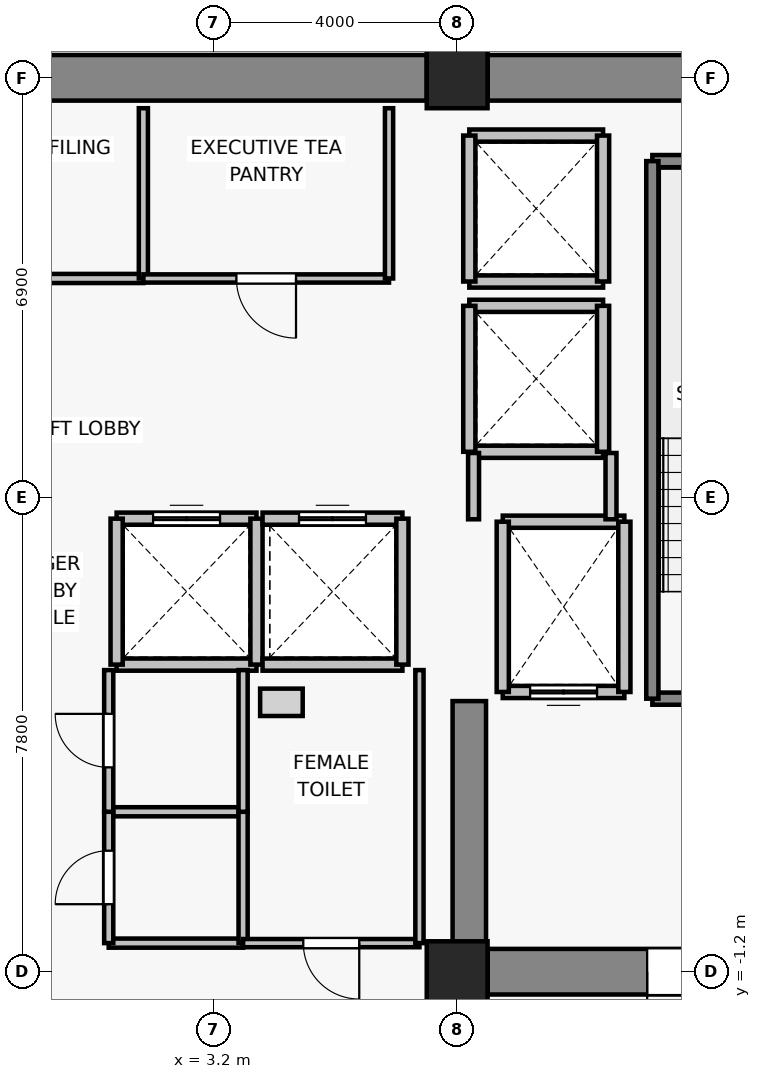
"""IFC4 building model, lengths in metres.
Left out: names, types, materials, properties, quantities, classifications, styles, units other than length and angle.
Written with IfcOpenShell. Run it as: python <this file> out.ifc"""

import sys

from ifc_helpers import new_model, si_unit, direction, frame, frame_2d, origin, origin_2d, place, context, subcontext, project, spatial, rectangle, extrude, source, transform, mapped, element, fill, save


model = new_model("IFC4")
c1 = context("Model", 3, precision=1e-05, world=origin(), true_north=direction((0.0, 1.0)))
c2 = subcontext(c1, "Body", "Model", "MODEL_VIEW")
j1 = project(units=[si_unit("LENGTHUNIT", "METRE"), si_unit("PLANEANGLEUNIT", "RADIAN")], contexts=[c1])
p1 = place(None, origin())
s1 = spatial("IfcSite", under=j1, at=p1, CompositionType="ELEMENT")
p2 = place(p1, origin())
s2 = spatial("IfcBuilding", under=s1, at=p2, CompositionType="ELEMENT")
p3 = place(p2, frame((0.0, 0.0, 175.9)))
s3 = spatial("IfcBuildingStorey", under=s2, at=p3, CompositionType="ELEMENT", Elevation=175.9)
for number, where, z_axis, x_axis in (
    (1, (7.2, -1.2, 0.0), (0.0, 0.0, 1.0), (1.0, 0.0, 0.0)),
    (2, (7.2, 13.5, 0.0), (0.0, 0.0, 1.0), (1.0, 0.0, 0.0)),
):
    element("IfcColumn", number, at=place(p3, frame(where, z_axis=z_axis, x_axis=x_axis)), inside=s3, PredefinedType="COLUMN", context=c2, shape_type="SweptSolid", body=[
        extrude(rectangle(XDim=1.0, YDim=1.0, at=origin_2d()), origin(), (0.0, 0.0, 1.0), 3.3),
    ])
p4 = place(p3, frame((-6.7, 13.5, 0.0), z_axis=(0.0, 0.0, 1.0), x_axis=(1.0, 0.0, 0.0)))
e3 = element("IfcWall", 3, at=p4, inside=s3, PredefinedType="SHEAR", context=c2, shape_type="SweptSolid", body=[
    extrude(rectangle(XDim=13.4, YDim=0.75, at=frame_2d((6.7, 0.0))), origin(), (0.0, 0.0, 1.0), 3.075),
])
p5 = place(p3, frame((7.7, 13.5, 0.0), z_axis=(0.0, 0.0, 1.0), x_axis=(1.0, 0.0, 0.0)))
e4 = element("IfcWall", 4, at=p5, inside=s3, PredefinedType="SHEAR", context=c2, shape_type="SweptSolid", body=[
    extrude(rectangle(XDim=6.2, YDim=0.75, at=frame_2d((3.1, 0.0))), origin(), (0.0, 0.0, 1.0), 3.075),
])
p6 = place(p3, frame((13.9, -1.2, 0.0), z_axis=(0.0, 0.0, 1.0), x_axis=(-1.0, 0.0, 0.0)))
e5 = element("IfcWall", 5, at=p6, inside=s3, PredefinedType="SHEAR", context=c2, shape_type="SweptSolid", body=[
    extrude(rectangle(XDim=6.2, YDim=0.75, at=frame_2d((3.1, 0.0))), origin(), (0.0, 0.0, 1.0), 3.075),
])
p7 = place(p6, frame((2.425, 0.0, 0.0)))
e6 = element("IfcOpeningElement", 6, at=p7, cuts=e5, PredefinedType="OPENING", context=c2, shape_type="SweptSolid", body=[
    extrude(rectangle(XDim=1.15, YDim=2.15, at=frame_2d((0.575, 1.075))), frame((0.0, 0.385, 0.0), z_axis=(0.0, -1.0, 0.0), x_axis=(1.0, 0.0, 0.0)), (0.0, 0.0, 1.0), 0.77),
])
p8 = place(p3, frame((7.4, -0.825, 0.0), z_axis=(0.0, 0.0, 1.0), x_axis=(0.0, 1.0, 0.0)))
e7 = element("IfcWall", 7, at=p8, inside=s3, PredefinedType="SHEAR", context=c2, shape_type="SweptSolid", body=[
    extrude(rectangle(XDim=4.075, YDim=0.55, at=frame_2d((2.038, 0.0))), origin(), (0.0, 0.0, 1.0), 3.075),
])
p9 = place(p3, frame((9.95, 3.4, 0.0), z_axis=(0.0, 0.0, 1.0), x_axis=(-1.0, 0.0, 0.0)))
e8 = element("IfcWall", 8, at=p9, inside=s3, PredefinedType="SOLIDWALL", context=c2, shape_type="SweptSolid", body=[
    extrude(rectangle(XDim=2.0, YDim=0.2, at=frame_2d((1.0, 0.0))), origin(), (0.0, 0.0, 1.0), 3.075),
])
p10 = place(p9, frame((0.45, 0.0, 0.0)))
e9 = element("IfcOpeningElement", 9, at=p10, cuts=e8, PredefinedType="OPENING", context=c2, shape_type="SweptSolid", body=[
    extrude(rectangle(XDim=1.1, YDim=2.2, at=frame_2d((0.55, 1.1))), frame((0.0, 0.11, 0.0), z_axis=(0.0, -1.0, 0.0), x_axis=(1.0, 0.0, 0.0)), (0.0, 0.0, 1.0), 0.22),
])
p11 = place(p3, frame((7.95, 6.2, 0.0), z_axis=(0.0, 0.0, 1.0), x_axis=(1.0, 0.0, 0.0)))
e10 = element("IfcWall", 10, at=p11, inside=s3, PredefinedType="SOLIDWALL", context=c2, shape_type="SweptSolid", body=[
    extrude(rectangle(XDim=2.0, YDim=0.2, at=frame_2d((1.0, 0.0))), origin(), (0.0, 0.0, 1.0), 3.075),
])
for number, where, z_axis, x_axis in (
    (11, (7.95, 3.4, 0.0), (0.0, 0.0, 1.0), (0.0, 1.0, 0.0)),
    (12, (9.95, 6.2, 0.0), (0.0, 0.0, 1.0), (0.0, -1.0, 0.0)),
):
    element("IfcWall", number, at=place(p3, frame(where, z_axis=z_axis, x_axis=x_axis)), inside=s3, PredefinedType="SOLIDWALL", context=c2, shape_type="SweptSolid", body=[
        extrude(rectangle(XDim=2.8, YDim=0.2, at=frame_2d((1.4, 0.0))), origin(), (0.0, 0.0, 1.0), 3.075),
    ])
p12 = place(p3, frame((3.9, 3.85, 0.0), z_axis=(0.0, 0.0, 1.0), x_axis=(-1.0, 0.0, 0.0)))
e13 = element("IfcWall", 13, at=p12, inside=s3, PredefinedType="SOLIDWALL", context=c2, shape_type="SweptSolid", body=[
    extrude(rectangle(XDim=2.3, YDim=0.2, at=frame_2d((1.15, 0.0))), origin(), (0.0, 0.0, 1.0), 3.075),
])
p13 = place(p3, frame((1.6, 6.25, 0.0), z_axis=(0.0, 0.0, 1.0), x_axis=(1.0, 0.0, 0.0)))
e14 = element("IfcWall", 14, at=p13, inside=s3, PredefinedType="SOLIDWALL", context=c2, shape_type="SweptSolid", body=[
    extrude(rectangle(XDim=2.3, YDim=0.2, at=frame_2d((1.15, 0.0))), origin(), (0.0, 0.0, 1.0), 3.075),
])
p14 = place(p13, frame((0.6, 0.0, 0.0)))
e15 = element("IfcOpeningElement", 15, at=p14, cuts=e14, PredefinedType="OPENING", context=c2, shape_type="SweptSolid", body=[
    extrude(rectangle(XDim=1.1, YDim=2.2, at=frame_2d((0.55, 1.1))), frame((0.0, 0.11, 0.0), z_axis=(0.0, -1.0, 0.0), x_axis=(1.0, 0.0, 0.0)), (0.0, 0.0, 1.0), 0.22),
])
for number, where, z_axis, x_axis in (
    (16, (1.6, 3.85, 0.0), (0.0, 0.0, 1.0), (0.0, 1.0, 0.0)),
    (17, (3.9, 6.25, 0.0), (0.0, 0.0, 1.0), (0.0, -1.0, 0.0)),
):
    element("IfcWall", number, at=place(p3, frame(where, z_axis=z_axis, x_axis=x_axis)), inside=s3, PredefinedType="SOLIDWALL", context=c2, shape_type="SweptSolid", body=[
        extrude(rectangle(XDim=2.4, YDim=0.2, at=frame_2d((1.2, 0.0))), origin(), (0.0, 0.0, 1.0), 3.075),
    ])
p15 = place(p3, frame((6.3, 3.85, 0.0), z_axis=(0.0, 0.0, 1.0), x_axis=(-1.0, 0.0, 0.0)))
e18 = element("IfcWall", 18, at=p15, inside=s3, PredefinedType="SOLIDWALL", context=c2, shape_type="SweptSolid", body=[
    extrude(rectangle(XDim=2.3, YDim=0.2, at=frame_2d((1.15, 0.0))), origin(), (0.0, 0.0, 1.0), 3.075),
])
p16 = place(p3, frame((4.0, 6.25, 0.0), z_axis=(0.0, 0.0, 1.0), x_axis=(1.0, 0.0, 0.0)))
e19 = element("IfcWall", 19, at=p16, inside=s3, PredefinedType="SOLIDWALL", context=c2, shape_type="SweptSolid", body=[
    extrude(rectangle(XDim=2.3, YDim=0.2, at=frame_2d((1.15, 0.0))), origin(), (0.0, 0.0, 1.0), 3.075),
])
p17 = place(p16, frame((0.6, 0.0, 0.0)))
e20 = element("IfcOpeningElement", 20, at=p17, cuts=e19, PredefinedType="OPENING", context=c2, shape_type="SweptSolid", body=[
    extrude(rectangle(XDim=1.1, YDim=2.2, at=frame_2d((0.55, 1.1))), frame((0.0, 0.11, 0.0), z_axis=(0.0, -1.0, 0.0), x_axis=(1.0, 0.0, 0.0)), (0.0, 0.0, 1.0), 0.22),
])
p18 = place(p3, frame((6.3, 6.25, 0.0), z_axis=(0.0, 0.0, 1.0), x_axis=(0.0, -1.0, 0.0)))
e21 = element("IfcWall", 21, at=p18, inside=s3, PredefinedType="SOLIDWALL", context=c2, shape_type="SweptSolid", body=[
    extrude(rectangle(XDim=2.4, YDim=0.2, at=frame_2d((1.2, 0.0))), origin(), (0.0, 0.0, 1.0), 3.075),
])
for number, where, z_axis, x_axis in (
    (22, (9.6, 7.35, 0.0), (0.0, 0.0, 1.0), (-1.0, 0.0, 0.0)),
    (23, (7.4, 9.75, 0.0), (0.0, 0.0, 1.0), (1.0, 0.0, 0.0)),
):
    element("IfcWall", number, at=place(p3, frame(where, z_axis=z_axis, x_axis=x_axis)), inside=s3, PredefinedType="SOLIDWALL", context=c2, shape_type="SweptSolid", body=[
        extrude(rectangle(XDim=2.2, YDim=0.2, at=frame_2d((1.1, 0.0))), origin(), (0.0, 0.0, 1.0), 2.565),
    ])
p19 = place(p3, frame((7.4, 7.35, 0.0), z_axis=(0.0, 0.0, 1.0), x_axis=(0.0, 1.0, 0.0)))
e24 = element("IfcWall", 24, at=p19, inside=s3, PredefinedType="SOLIDWALL", context=c2, shape_type="SweptSolid", body=[
    extrude(rectangle(XDim=2.4, YDim=0.2, at=frame_2d((1.2, 0.0))), origin(), (0.0, 0.0, 1.0), 2.565),
])
p20 = place(p3, frame((9.6, 9.75, 0.0), z_axis=(0.0, 0.0, 1.0), x_axis=(0.0, -1.0, 0.0)))
e25 = element("IfcWall", 25, at=p20, inside=s3, PredefinedType="SOLIDWALL", context=c2, shape_type="SweptSolid", body=[
    extrude(rectangle(XDim=2.4, YDim=0.2, at=frame_2d((1.2, 0.0))), origin(), (0.0, 0.0, 1.0), 3.075),
])
for number, where, z_axis, x_axis in (
    (26, (9.6, 10.15, 0.0), (0.0, 0.0, 1.0), (-1.0, 0.0, 0.0)),
    (27, (7.4, 12.55, 0.0), (0.0, 0.0, 1.0), (1.0, 0.0, 0.0)),
):
    element("IfcWall", number, at=place(p3, frame(where, z_axis=z_axis, x_axis=x_axis)), inside=s3, PredefinedType="SOLIDWALL", context=c2, shape_type="SweptSolid", body=[
        extrude(rectangle(XDim=2.2, YDim=0.2, at=frame_2d((1.1, 0.0))), origin(), (0.0, 0.0, 1.0), 2.565),
    ])
p21 = place(p3, frame((7.4, 10.15, 0.0), z_axis=(0.0, 0.0, 1.0), x_axis=(0.0, 1.0, 0.0)))
e28 = element("IfcWall", 28, at=p21, inside=s3, PredefinedType="SOLIDWALL", context=c2, shape_type="SweptSolid", body=[
    extrude(rectangle(XDim=2.4, YDim=0.2, at=frame_2d((1.2, 0.0))), origin(), (0.0, 0.0, 1.0), 2.565),
])
p22 = place(p3, frame((9.6, 12.55, 0.0), z_axis=(0.0, 0.0, 1.0), x_axis=(0.0, -1.0, 0.0)))
e29 = element("IfcWall", 29, at=p22, inside=s3, PredefinedType="SOLIDWALL", context=c2, shape_type="SweptSolid", body=[
    extrude(rectangle(XDim=2.4, YDim=0.2, at=frame_2d((1.2, 0.0))), origin(), (0.0, 0.0, 1.0), 3.075),
])
p23 = place(p3, frame((13.93, 3.29, 0.0), z_axis=(0.0, 0.0, 1.0), x_axis=(-1.0, 0.0, 0.0)))
e30 = element("IfcWall", 30, at=p23, inside=s3, PredefinedType="SOLIDWALL", context=c2, shape_type="SweptSolid", body=[
    extrude(rectangle(XDim=3.52, YDim=0.2, at=frame_2d((1.76, 0.0))), origin(), (0.0, 0.0, 1.0), 3.075),
])
p24 = place(p23, frame((1.205, 0.0, 0.0)))
e31 = element("IfcOpeningElement", 31, at=p24, cuts=e30, PredefinedType="OPENING", context=c2, shape_type="SweptSolid", body=[
    extrude(rectangle(XDim=1.15, YDim=2.15, at=frame_2d((0.575, 1.075))), frame((0.0, 0.11, 0.0), z_axis=(0.0, -1.0, 0.0), x_axis=(1.0, 0.0, 0.0)), (0.0, 0.0, 1.0), 0.22),
])
p25 = place(p3, frame((10.41, 12.13, 0.0), z_axis=(0.0, 0.0, 1.0), x_axis=(1.0, 0.0, 0.0)))
e32 = element("IfcWall", 32, at=p25, inside=s3, PredefinedType="SOLIDWALL", context=c2, shape_type="SweptSolid", body=[
    extrude(rectangle(XDim=3.52, YDim=0.2, at=frame_2d((1.76, 0.0))), origin(), (0.0, 0.0, 1.0), 3.075),
])
p26 = place(p3, frame((10.41, 3.29, 0.0), z_axis=(0.0, 0.0, 1.0), x_axis=(0.0, 1.0, 0.0)))
e33 = element("IfcWall", 33, at=p26, inside=s3, PredefinedType="SOLIDWALL", context=c2, shape_type="SweptSolid", body=[
    extrude(rectangle(XDim=8.84, YDim=0.2, at=frame_2d((4.42, 0.0))), origin(), (0.0, 0.0, 1.0), 3.075),
])
p27 = place(p3, frame((7.47, 6.24, 0.0), z_axis=(0.0, 0.0, 1.0), x_axis=(0.0, 1.0, 0.0)))
e34 = element("IfcWall", 34, at=p27, inside=s3, PredefinedType="PARTITIONING", context=c2, shape_type="SweptSolid", body=[
    extrude(rectangle(XDim=1.09, YDim=0.18, at=frame_2d((0.545, 0.0))), origin(), (0.0, 0.0, 1.0), 2.565),
])
p28 = place(p3, frame((9.73, 7.33, 0.0), z_axis=(0.0, 0.0, 1.0), x_axis=(0.0, -1.0, 0.0)))
e35 = element("IfcWall", 35, at=p28, inside=s3, PredefinedType="PARTITIONING", context=c2, shape_type="SweptSolid", body=[
    extrude(rectangle(XDim=1.09, YDim=0.18, at=frame_2d((0.545, 0.0))), origin(), (0.0, 0.0, 1.0), 3.075),
])
p29 = place(p3, frame((2.04, 10.2, 0.0), z_axis=(0.0, 0.0, 1.0), x_axis=(-1.0, 0.0, 0.0)))
e36 = element("IfcWall", 36, at=p29, inside=s3, PredefinedType="PARTITIONING", context=c2, shape_type="SweptSolid", body=[
    extrude(rectangle(XDim=4.16, YDim=0.15, at=frame_2d((2.08, 0.0))), origin(), (0.0, 0.0, 1.0), 3.075),
])
p30 = place(p29, frame((1.55, 0.0, 0.0)))
e37 = element("IfcOpeningElement", 37, at=p30, cuts=e36, PredefinedType="OPENING", context=c2, shape_type="SweptSolid", body=[
    extrude(rectangle(XDim=0.98, YDim=2.15, at=frame_2d((0.49, 1.075))), frame((0.0, 0.085, 0.0), z_axis=(0.0, -1.0, 0.0), x_axis=(1.0, 0.0, 0.0)), (0.0, 0.0, 1.0), 0.17),
])
p31 = place(p3, frame((2.04, 13.0, 0.0), z_axis=(0.0, 0.0, 1.0), x_axis=(0.0, -1.0, 0.0)))
e38 = element("IfcWall", 38, at=p31, inside=s3, PredefinedType="PARTITIONING", context=c2, shape_type="SweptSolid", body=[
    extrude(rectangle(XDim=2.8, YDim=0.15, at=frame_2d((1.4, 0.0))), origin(), (0.0, 0.0, 1.0), 3.075),
])
p32 = place(p3, frame((6.08, 10.2, 0.0), z_axis=(0.0, 0.0, 1.0), x_axis=(-1.0, 0.0, 0.0)))
e39 = element("IfcWall", 39, at=p32, inside=s3, PredefinedType="PARTITIONING", context=c2, shape_type="SweptSolid", body=[
    extrude(rectangle(XDim=4.04, YDim=0.135, at=frame_2d((2.02, 0.0))), origin(), (0.0, 0.0, 1.0), 3.075),
])
p33 = place(p32, frame((1.53, 0.0, 0.0)))
e40 = element("IfcOpeningElement", 40, at=p33, cuts=e39, PredefinedType="OPENING", context=c2, shape_type="SweptSolid", body=[
    extrude(rectangle(XDim=0.98, YDim=2.15, at=frame_2d((0.49, 1.075))), frame((0.0, 0.077, 0.0), z_axis=(0.0, -1.0, 0.0), x_axis=(1.0, 0.0, 0.0)), (0.0, 0.0, 1.0), 0.155),
])
p34 = place(p3, frame((6.08, 13.0, 0.0), z_axis=(0.0, 0.0, 1.0), x_axis=(0.0, -1.0, 0.0)))
e41 = element("IfcWall", 41, at=p34, inside=s3, PredefinedType="PARTITIONING", context=c2, shape_type="SweptSolid", body=[
    extrude(rectangle(XDim=2.8, YDim=0.135, at=frame_2d((1.4, 0.0))), origin(), (0.0, 0.0, 1.0), 3.075),
])
for number, where, z_axis, x_axis in (
    (42, (3.68, -0.73, 0.0), (0.0, 0.0, 1.0), (-1.0, 0.0, 0.0)),
    (43, (1.47, 1.43, 0.0), (0.0, 0.0, 1.0), (1.0, 0.0, 0.0)),
):
    element("IfcWall", number, at=place(p3, frame(where, z_axis=z_axis, x_axis=x_axis)), inside=s3, PredefinedType="PARTITIONING", context=c2, shape_type="SweptSolid", body=[
        extrude(rectangle(XDim=2.21, YDim=0.15, at=frame_2d((1.105, 0.0))), origin(), (0.0, 0.0, 1.0), 3.075),
    ])
p35 = place(p3, frame((1.47, -0.73, 0.0), z_axis=(0.0, 0.0, 1.0), x_axis=(0.0, 1.0, 0.0)))
e44 = element("IfcWall", 44, at=p35, inside=s3, PredefinedType="PARTITIONING", context=c2, shape_type="SweptSolid", body=[
    extrude(rectangle(XDim=2.16, YDim=0.15, at=frame_2d((1.08, 0.0))), origin(), (0.0, 0.0, 1.0), 3.075),
])
p36 = place(p35, frame((0.64, 0.0, 0.0)))
e45 = element("IfcOpeningElement", 45, at=p36, cuts=e44, PredefinedType="OPENING", context=c2, shape_type="SweptSolid", body=[
    extrude(rectangle(XDim=0.88, YDim=2.1, at=frame_2d((0.44, 1.05))), frame((0.0, 0.085, 0.0), z_axis=(0.0, -1.0, 0.0), x_axis=(1.0, 0.0, 0.0)), (0.0, 0.0, 1.0), 0.17),
])
p37 = place(p3, frame((3.68, 1.43, 0.0), z_axis=(0.0, 0.0, 1.0), x_axis=(0.0, -1.0, 0.0)))
e46 = element("IfcWall", 46, at=p37, inside=s3, PredefinedType="PARTITIONING", context=c2, shape_type="SweptSolid", body=[
    extrude(rectangle(XDim=2.16, YDim=0.15, at=frame_2d((1.08, 0.0))), origin(), (0.0, 0.0, 1.0), 3.075),
])
p38 = place(p3, frame((1.47, 1.43, 0.0), z_axis=(0.0, 0.0, 1.0), x_axis=(0.0, 1.0, 0.0)))
e47 = element("IfcWall", 47, at=p38, inside=s3, PredefinedType="PARTITIONING", context=c2, shape_type="SweptSolid", body=[
    extrude(rectangle(XDim=2.33, YDim=0.15, at=frame_2d((1.165, 0.0))), origin(), (0.0, 0.0, 1.0), 3.075),
])
p39 = place(p38, frame((0.73, 0.0, 0.0)))
e48 = element("IfcOpeningElement", 48, at=p39, cuts=e47, PredefinedType="OPENING", context=c2, shape_type="SweptSolid", body=[
    extrude(rectangle(XDim=0.88, YDim=2.15, at=frame_2d((0.44, 1.075))), frame((0.0, 0.085, 0.0), z_axis=(0.0, -1.0, 0.0), x_axis=(1.0, 0.0, 0.0)), (0.0, 0.0, 1.0), 0.17),
])
p40 = place(p3, frame((3.68, 3.76, 0.0), z_axis=(0.0, 0.0, 1.0), x_axis=(0.0, -1.0, 0.0)))
e49 = element("IfcWall", 49, at=p40, inside=s3, PredefinedType="PARTITIONING", context=c2, shape_type="SweptSolid", body=[
    extrude(rectangle(XDim=2.33, YDim=0.15, at=frame_2d((1.165, 0.0))), origin(), (0.0, 0.0, 1.0), 3.075),
])
p41 = place(p3, frame((6.58, -0.73, 0.0), z_axis=(0.0, 0.0, 1.0), x_axis=(-1.0, 0.0, 0.0)))
e50 = element("IfcWall", 50, at=p41, inside=s3, PredefinedType="PARTITIONING", context=c2, shape_type="SweptSolid", body=[
    extrude(rectangle(XDim=2.9, YDim=0.135, at=frame_2d((1.45, 0.0))), origin(), (0.0, 0.0, 1.0), 3.075),
])
p42 = place(p41, frame((0.99, 0.0, 0.0)))
e51 = element("IfcOpeningElement", 51, at=p42, cuts=e50, PredefinedType="OPENING", context=c2, shape_type="SweptSolid", body=[
    extrude(rectangle(XDim=0.92, YDim=2.1, at=frame_2d((0.46, 1.05))), frame((0.0, 0.077, 0.0), z_axis=(0.0, -1.0, 0.0), x_axis=(1.0, 0.0, 0.0)), (0.0, 0.0, 1.0), 0.155),
])
p43 = place(p3, frame((6.58, 3.76, 0.0), z_axis=(0.0, 0.0, 1.0), x_axis=(0.0, -1.0, 0.0)))
e52 = element("IfcWall", 52, at=p43, inside=s3, PredefinedType="PARTITIONING", context=c2, shape_type="SweptSolid", body=[
    extrude(rectangle(XDim=4.49, YDim=0.135, at=frame_2d((2.245, 0.0))), origin(), (0.0, 0.0, 1.0), 3.075),
])
m1 = source(origin(), c2, "Body", "SweptSolid", [
    extrude(rectangle(XDim=1.1, YDim=2.2, at=frame_2d((0.55, 1.1))), frame((0.0, 0.025, 0.0), z_axis=(0.0, -1.0, 0.0), x_axis=(1.0, 0.0, 0.0)), (0.0, 0.0, 1.0), 0.05),
])
p44 = place(p10, origin())
e53 = element("IfcDoor", 53, at=p44, inside=s3, OperationType="DOUBLE_DOOR_SLIDING", PredefinedType="DOOR", context=c2, shape_type="MappedRepresentation", body=[
    mapped(m1, transform((0.0, 0.0, 0.0), x_axis=(1.0, 0.0, 0.0), y_axis=(0.0, 1.0, 0.0), z_axis=(0.0, 0.0, 1.0), scale=1.0)),
])
fill(e9, e53)
p45 = place(p14, origin())
e54 = element("IfcDoor", 54, at=p45, inside=s3, OperationType="DOUBLE_DOOR_SLIDING", PredefinedType="DOOR", context=c2, shape_type="MappedRepresentation", body=[
    mapped(m1, transform((0.0, 0.0, 0.0), x_axis=(1.0, 0.0, 0.0), y_axis=(0.0, 1.0, 0.0), z_axis=(0.0, 0.0, 1.0), scale=1.0)),
])
fill(e15, e54)
p46 = place(p17, origin())
e55 = element("IfcDoor", 55, at=p46, inside=s3, OperationType="DOUBLE_DOOR_SLIDING", PredefinedType="DOOR", context=c2, shape_type="MappedRepresentation", body=[
    mapped(m1, transform((0.0, 0.0, 0.0), x_axis=(1.0, 0.0, 0.0), y_axis=(0.0, 1.0, 0.0), z_axis=(0.0, 0.0, 1.0), scale=1.0)),
])
fill(e20, e55)
m2 = source(origin(), c2, "Body", "SweptSolid", [
    extrude(rectangle(XDim=1.15, YDim=2.15, at=frame_2d((0.575, 1.075))), frame((0.0, 0.025, 0.0), z_axis=(0.0, -1.0, 0.0), x_axis=(1.0, 0.0, 0.0)), (0.0, 0.0, 1.0), 0.05),
])
p47 = place(p7, origin())
e56 = element("IfcDoor", 56, at=p47, inside=s3, OperationType="SINGLE_SWING_RIGHT", PredefinedType="DOOR", context=c2, shape_type="MappedRepresentation", body=[
    mapped(m2, transform((0.0, 0.0, 0.0), x_axis=(1.0, 0.0, 0.0), y_axis=(0.0, 1.0, 0.0), z_axis=(0.0, 0.0, 1.0), scale=1.0)),
])
fill(e6, e56)
m3 = source(origin(), c2, "Body", "SweptSolid", [
    extrude(rectangle(XDim=0.98, YDim=2.15, at=frame_2d((0.49, 1.075))), frame((0.0, 0.025, 0.0), z_axis=(0.0, -1.0, 0.0), x_axis=(1.0, 0.0, 0.0)), (0.0, 0.0, 1.0), 0.05),
])
p48 = place(p33, origin())
e57 = element("IfcDoor", 57, at=p48, inside=s3, OperationType="SINGLE_SWING_LEFT", PredefinedType="DOOR", context=c2, shape_type="MappedRepresentation", body=[
    mapped(m3, transform((0.0, 0.0, 0.0), x_axis=(1.0, 0.0, 0.0), y_axis=(0.0, 1.0, 0.0), z_axis=(0.0, 0.0, 1.0), scale=1.0)),
])
fill(e40, e57)
m4 = source(origin(), c2, "Body", "SweptSolid", [
    extrude(rectangle(XDim=0.88, YDim=2.1, at=frame_2d((0.44, 1.05))), frame((0.0, 0.025, 0.0), z_axis=(0.0, -1.0, 0.0), x_axis=(1.0, 0.0, 0.0)), (0.0, 0.0, 1.0), 0.05),
])
p49 = place(p36, origin())
e58 = element("IfcDoor", 58, at=p49, inside=s3, OperationType="SINGLE_SWING_LEFT", PredefinedType="DOOR", context=c2, shape_type="MappedRepresentation", body=[
    mapped(m4, transform((0.0, 0.0, 0.0), x_axis=(1.0, 0.0, 0.0), y_axis=(0.0, 1.0, 0.0), z_axis=(0.0, 0.0, 1.0), scale=1.0)),
])
fill(e45, e58)
m5 = source(origin(), c2, "Body", "SweptSolid", [
    extrude(rectangle(XDim=0.88, YDim=2.15, at=frame_2d((0.44, 1.075))), frame((0.0, 0.025, 0.0), z_axis=(0.0, -1.0, 0.0), x_axis=(1.0, 0.0, 0.0)), (0.0, 0.0, 1.0), 0.05),
])
p50 = place(p39, origin())
e59 = element("IfcDoor", 59, at=p50, inside=s3, OperationType="SINGLE_SWING_RIGHT", PredefinedType="DOOR", context=c2, shape_type="MappedRepresentation", body=[
    mapped(m5, transform((0.0, 0.0, 0.0), x_axis=(1.0, 0.0, 0.0), y_axis=(0.0, 1.0, 0.0), z_axis=(0.0, 0.0, 1.0), scale=1.0)),
])
fill(e48, e59)
m6 = source(origin(), c2, "Body", "SweptSolid", [
    extrude(rectangle(XDim=0.92, YDim=2.1, at=frame_2d((0.46, 1.05))), frame((0.0, 0.025, 0.0), z_axis=(0.0, -1.0, 0.0), x_axis=(1.0, 0.0, 0.0)), (0.0, 0.0, 1.0), 0.05),
])
p51 = place(p42, origin())
e60 = element("IfcDoor", 60, at=p51, inside=s3, OperationType="SINGLE_SWING_LEFT", PredefinedType="DOOR", context=c2, shape_type="MappedRepresentation", body=[
    mapped(m6, transform((0.0, 0.0, 0.0), x_axis=(1.0, 0.0, 0.0), y_axis=(0.0, 1.0, 0.0), z_axis=(0.0, 0.0, 1.0), scale=1.0)),
])
fill(e51, e60)
save(model, sys.argv[1])
